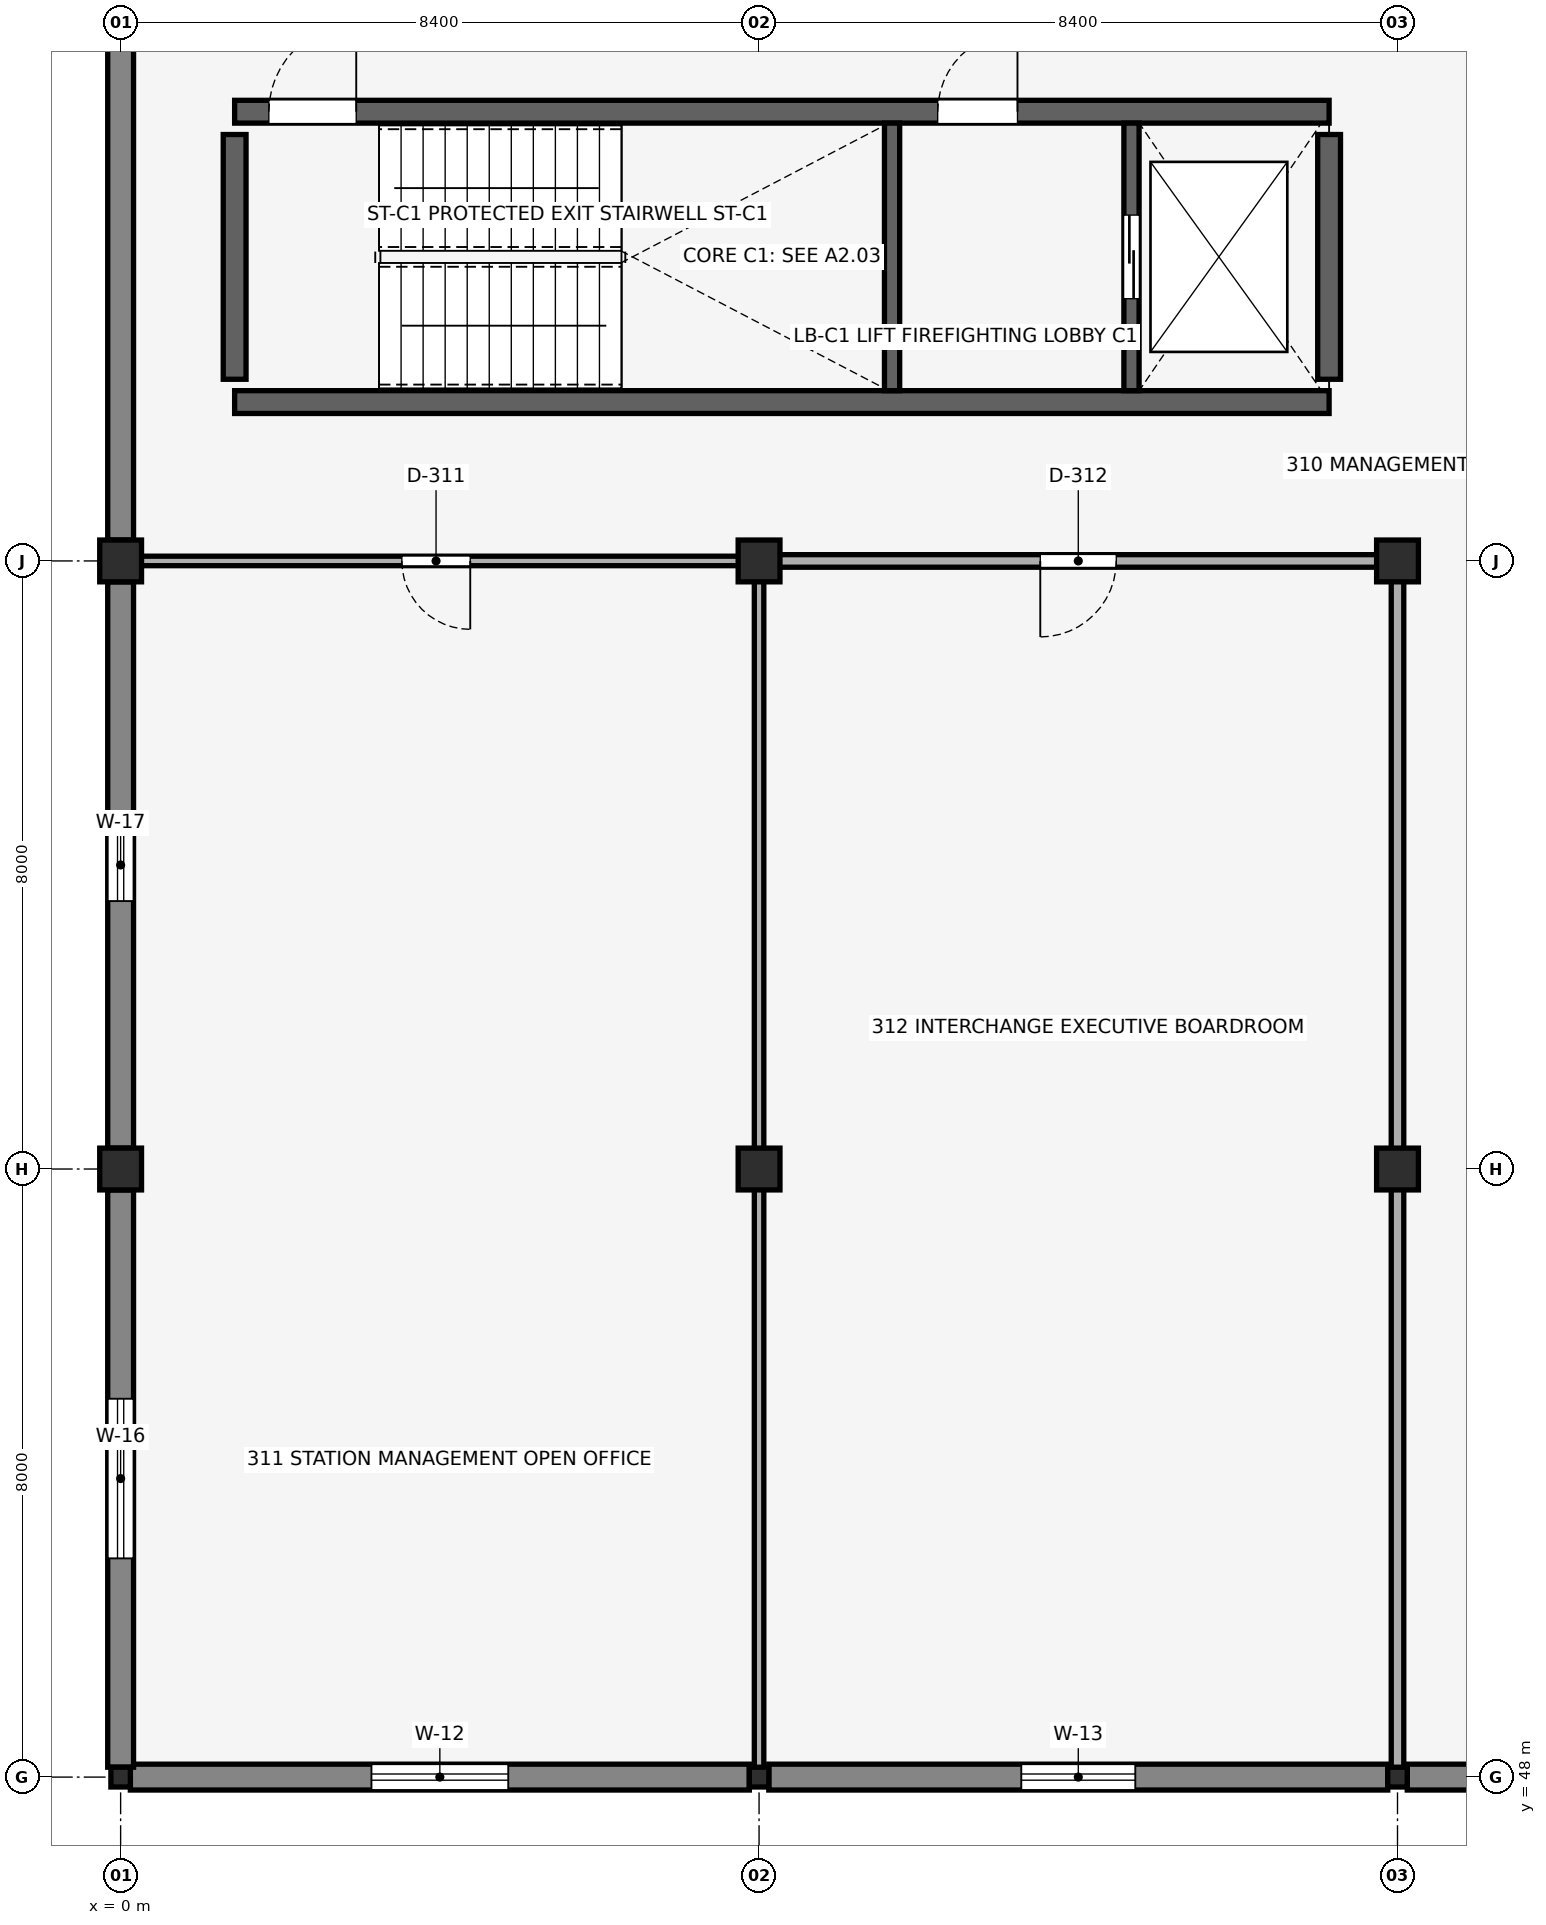
"""IFC4 building model, lengths in metres.
Left out: names, types, materials, properties, quantities, classifications, styles, units other than length and angle.
Written with IfcOpenShell. Run it as: python <this file> out.ifc"""

import sys

from ifc_helpers import new_model, si_unit, direction, frame, frame_2d, origin, origin_2d, place, context, subcontext, project, spatial, rectangle, i_section, extrude, element, fill, save


model = new_model("IFC4")
c1 = context("Model", 3, precision=1e-05, world=origin(), true_north=direction((0.0, 1.0)))
c2 = subcontext(c1, "Body", "Model", "MODEL_VIEW")
j1 = project(units=[si_unit("LENGTHUNIT", "METRE"), si_unit("PLANEANGLEUNIT", "RADIAN")], contexts=[c1])
p1 = place(None, origin())
s1 = spatial("IfcSite", under=j1, at=p1, CompositionType="ELEMENT")
p2 = place(p1, origin())
s2 = spatial("IfcBuilding", under=s1, at=p2, CompositionType="ELEMENT")
p3 = place(p2, frame((0.0, 0.0, 13.36)))
s3 = spatial("IfcBuildingStorey", under=s2, at=p3, CompositionType="ELEMENT", Elevation=13.36)
p4 = place(p3, frame((1.5, 66.09, 0.0), z_axis=(0.0, 0.0, 1.0), x_axis=(1.0, 0.0, 0.0)))
e1 = element("IfcWall", 1, at=p4, inside=s3, PredefinedType="SHEAR", context=c2, shape_type="SweptSolid", body=[
    extrude(rectangle(XDim=14.4, YDim=0.3, at=frame_2d((7.2, 0.0))), origin(), (0.0, 0.0, 1.0), 3.58),
])
p5 = place(p3, frame((1.5, 69.91, 0.0), z_axis=(0.0, 0.0, 1.0), x_axis=(1.0, 0.0, 0.0)))
e2 = element("IfcWall", 2, at=p5, inside=s3, PredefinedType="SHEAR", context=c2, shape_type="SweptSolid", body=[
    extrude(rectangle(XDim=14.4, YDim=0.3, at=frame_2d((7.2, 0.0))), origin(), (0.0, 0.0, 1.0), 3.58),
])
p6 = place(p5, frame((0.45, 0.0, 0.0), z_axis=(0.0, 0.0, 1.0), x_axis=(1.0, 0.0, 0.0)))
e3 = element("IfcOpeningElement", 3, at=p6, cuts=e2, PredefinedType="OPENING", context=c2, shape_type="SweptSolid", body=[
    extrude(rectangle(XDim=1.15, YDim=2.15, at=frame_2d((0.575, 1.075))), frame((0.0, 0.16, 0.0), z_axis=(0.0, -1.0, 0.0), x_axis=(1.0, 0.0, 0.0)), (0.0, 0.0, 1.0), 0.32),
])
p7 = place(p5, frame((9.25, 0.0, 0.0), z_axis=(0.0, 0.0, 1.0), x_axis=(1.0, 0.0, 0.0)))
e4 = element("IfcOpeningElement", 4, at=p7, cuts=e2, PredefinedType="OPENING", context=c2, shape_type="SweptSolid", body=[
    extrude(rectangle(XDim=1.05, YDim=2.15, at=frame_2d((0.525, 1.075))), frame((0.0, 0.16, 0.0), z_axis=(0.0, -1.0, 0.0), x_axis=(1.0, 0.0, 0.0)), (0.0, 0.0, 1.0), 0.32),
])
for number, where, z_axis, x_axis in (
    (5, (1.5, 66.39, 0.0), (0.0, 0.0, 1.0), (0.0, 1.0, 0.0)),
    (6, (15.9, 66.39, 0.0), (0.0, 0.0, 1.0), (0.0, 1.0, 0.0)),
):
    element("IfcWall", number, at=place(p3, frame(where, z_axis=z_axis, x_axis=x_axis)), inside=s3, PredefinedType="SHEAR", context=c2, shape_type="SweptSolid", body=[
        extrude(rectangle(XDim=3.22, YDim=0.3, at=frame_2d((1.61, 0.0))), origin(), (0.0, 0.0, 1.0), 3.58),
    ])
p8 = place(p3, frame((0.0, 48.0, 0.0), z_axis=(0.0, 0.0, 1.0), x_axis=(1.0, 0.0, 0.0)))
e7 = element("IfcColumn", 7, at=p8, inside=s3, PredefinedType="COLUMN", context=c2, shape_type="SweptSolid", body=[
    extrude(i_section(OverallWidth=0.256, OverallDepth=0.26, WebThickness=0.01, FlangeThickness=0.017, FilletRadius=0.013, at=origin_2d()), origin(), (0.0, 0.0, 1.0), 3.58),
])
for number, where, z_axis, x_axis in (
    (8, (0.0, 56.0, 0.0), (0.0, 0.0, 1.0), (1.0, 0.0, 0.0)),
    (9, (0.0, 64.0, 0.0), (0.0, 0.0, 1.0), (1.0, 0.0, 0.0)),
):
    element("IfcColumn", number, at=place(p3, frame(where, z_axis=z_axis, x_axis=x_axis)), inside=s3, PredefinedType="COLUMN", context=c2, shape_type="SweptSolid", body=[
        extrude(rectangle(XDim=0.55, YDim=0.55, at=origin_2d()), origin(), (0.0, 0.0, 1.0), 3.58),
    ])
p9 = place(p3, frame((8.4, 48.0, 0.0), z_axis=(0.0, 0.0, 1.0), x_axis=(1.0, 0.0, 0.0)))
e10 = element("IfcColumn", 10, at=p9, inside=s3, PredefinedType="COLUMN", context=c2, shape_type="SweptSolid", body=[
    extrude(i_section(OverallWidth=0.256, OverallDepth=0.26, WebThickness=0.01, FlangeThickness=0.017, FilletRadius=0.013, at=origin_2d()), origin(), (0.0, 0.0, 1.0), 3.58),
])
for number, where, z_axis, x_axis in (
    (11, (8.4, 56.0, 0.0), (0.0, 0.0, 1.0), (1.0, 0.0, 0.0)),
    (12, (8.4, 64.0, 0.0), (0.0, 0.0, 1.0), (1.0, 0.0, 0.0)),
):
    element("IfcColumn", number, at=place(p3, frame(where, z_axis=z_axis, x_axis=x_axis)), inside=s3, PredefinedType="COLUMN", context=c2, shape_type="SweptSolid", body=[
        extrude(rectangle(XDim=0.55, YDim=0.55, at=origin_2d()), origin(), (0.0, 0.0, 1.0), 3.58),
    ])
p10 = place(p3, frame((16.8, 48.0, 0.0), z_axis=(0.0, 0.0, 1.0), x_axis=(1.0, 0.0, 0.0)))
e13 = element("IfcColumn", 13, at=p10, inside=s3, PredefinedType="COLUMN", context=c2, shape_type="SweptSolid", body=[
    extrude(i_section(OverallWidth=0.256, OverallDepth=0.26, WebThickness=0.01, FlangeThickness=0.017, FilletRadius=0.013, at=origin_2d()), origin(), (0.0, 0.0, 1.0), 3.58),
])
for number, where, z_axis, x_axis in (
    (14, (16.8, 56.0, 0.0), (0.0, 0.0, 1.0), (1.0, 0.0, 0.0)),
    (15, (16.8, 64.0, 0.0), (0.0, 0.0, 1.0), (1.0, 0.0, 0.0)),
):
    element("IfcColumn", number, at=place(p3, frame(where, z_axis=z_axis, x_axis=x_axis)), inside=s3, PredefinedType="COLUMN", context=c2, shape_type="SweptSolid", body=[
        extrude(rectangle(XDim=0.55, YDim=0.55, at=origin_2d()), origin(), (0.0, 0.0, 1.0), 3.58),
    ])
p11 = place(p3, frame((0.128, 48.0, 0.0), z_axis=(0.0, 0.0, 1.0), x_axis=(1.0, 0.0, 0.0)))
e16 = element("IfcWall", 16, at=p11, inside=s3, PredefinedType="SOLIDWALL", context=c2, shape_type="SweptSolid", body=[
    extrude(rectangle(XDim=8.144, YDim=0.34, at=frame_2d((4.072, 0.0))), origin(), (0.0, 0.0, 1.0), 3.28),
])
p12 = place(p11, frame((3.172, 0.0, 0.9), z_axis=(0.0, 0.0, 1.0), x_axis=(1.0, 0.0, 0.0)))
e17 = element("IfcOpeningElement", 17, at=p12, cuts=e16, PredefinedType="OPENING", context=c2, shape_type="SweptSolid", body=[
    extrude(rectangle(XDim=1.8, YDim=1.3, at=frame_2d((0.9, 0.65))), frame((0.0, 0.18, 0.0), z_axis=(0.0, -1.0, 0.0), x_axis=(1.0, 0.0, 0.0)), (0.0, 0.0, 1.0), 0.36),
])
p13 = place(p3, frame((8.528, 48.0, 0.0), z_axis=(0.0, 0.0, 1.0), x_axis=(1.0, 0.0, 0.0)))
e18 = element("IfcWall", 18, at=p13, inside=s3, PredefinedType="SOLIDWALL", context=c2, shape_type="SweptSolid", body=[
    extrude(rectangle(XDim=8.144, YDim=0.34, at=frame_2d((4.072, 0.0))), origin(), (0.0, 0.0, 1.0), 3.28),
])
p14 = place(p13, frame((3.322, 0.0, 0.9), z_axis=(0.0, 0.0, 1.0), x_axis=(1.0, 0.0, 0.0)))
e19 = element("IfcOpeningElement", 19, at=p14, cuts=e18, PredefinedType="OPENING", context=c2, shape_type="SweptSolid", body=[
    extrude(rectangle(XDim=1.5, YDim=1.4, at=frame_2d((0.75, 0.7))), frame((0.0, 0.18, 0.0), z_axis=(0.0, -1.0, 0.0), x_axis=(1.0, 0.0, 0.0)), (0.0, 0.0, 1.0), 0.36),
])
p15 = place(p3, frame((16.928, 48.0, 0.0), z_axis=(0.0, 0.0, 1.0), x_axis=(1.0, 0.0, 0.0)))
e20 = element("IfcWall", 20, at=p15, inside=s3, PredefinedType="SOLIDWALL", context=c2, shape_type="SweptSolid", body=[
    extrude(rectangle(XDim=8.144, YDim=0.34, at=frame_2d((4.072, 0.0))), origin(), (0.0, 0.0, 1.0), 3.28),
])
p16 = place(p15, frame((2.472, 0.0, 1.55), z_axis=(0.0, 0.0, 1.0), x_axis=(1.0, 0.0, 0.0)))
e21 = element("IfcOpeningElement", 21, at=p16, cuts=e20, PredefinedType="OPENING", context=c2, shape_type="SweptSolid", body=[
    extrude(rectangle(XDim=3.2, YDim=0.9, at=frame_2d((1.6, 0.45))), frame((0.0, 0.18, 0.0), z_axis=(0.0, -1.0, 0.0), x_axis=(1.0, 0.0, 0.0)), (0.0, 0.0, 1.0), 0.36),
])
p17 = place(p3, frame((0.0, 48.13, 0.0), z_axis=(0.0, 0.0, 1.0), x_axis=(0.0, 1.0, 0.0)))
e22 = element("IfcWall", 22, at=p17, inside=s3, PredefinedType="SOLIDWALL", context=c2, shape_type="SweptSolid", body=[
    extrude(rectangle(XDim=7.595, YDim=0.34, at=frame_2d((3.797, 0.0))), origin(), (0.0, 0.0, 1.0), 3.28),
])
p18 = place(p17, frame((2.748, 0.0, 1.55), z_axis=(0.0, 0.0, 1.0), x_axis=(1.0, 0.0, 0.0)))
e23 = element("IfcOpeningElement", 23, at=p18, cuts=e22, PredefinedType="OPENING", context=c2, shape_type="SweptSolid", body=[
    extrude(rectangle(XDim=2.1, YDim=0.8, at=frame_2d((1.05, 0.4))), frame((0.0, 0.18, 0.0), z_axis=(0.0, -1.0, 0.0), x_axis=(1.0, 0.0, 0.0)), (0.0, 0.0, 1.0), 0.36),
])
p19 = place(p3, frame((0.0, 56.275, 0.0), z_axis=(0.0, 0.0, 1.0), x_axis=(0.0, 1.0, 0.0)))
e24 = element("IfcWall", 24, at=p19, inside=s3, PredefinedType="SOLIDWALL", context=c2, shape_type="SweptSolid", body=[
    extrude(rectangle(XDim=7.45, YDim=0.34, at=frame_2d((3.725, 0.0))), origin(), (0.0, 0.0, 1.0), 3.28),
])
p20 = place(p19, frame((3.25, 0.0, 0.65), z_axis=(0.0, 0.0, 1.0), x_axis=(1.0, 0.0, 0.0)))
e25 = element("IfcOpeningElement", 25, at=p20, cuts=e24, PredefinedType="OPENING", context=c2, shape_type="SweptSolid", body=[
    extrude(rectangle(XDim=0.95, YDim=2.1, at=frame_2d((0.475, 1.05))), frame((0.0, 0.18, 0.0), z_axis=(0.0, -1.0, 0.0), x_axis=(1.0, 0.0, 0.0)), (0.0, 0.0, 1.0), 0.36),
])
p21 = place(p3, frame((0.0, 64.275, 0.0), z_axis=(0.0, 0.0, 1.0), x_axis=(0.0, 1.0, 0.0)))
e26 = element("IfcWall", 26, at=p21, inside=s3, PredefinedType="SOLIDWALL", context=c2, shape_type="SweptSolid", body=[
    extrude(rectangle(XDim=7.45, YDim=0.34, at=frame_2d((3.725, 0.0))), origin(), (0.0, 0.0, 1.0), 3.28),
])
p22 = place(p3, frame((10.15, 66.24, 0.0), z_axis=(0.0, 0.0, 1.0), x_axis=(0.0, 1.0, 0.0)))
e27 = element("IfcWall", 27, at=p22, inside=s3, PredefinedType="SHEAR", context=c2, shape_type="SweptSolid", body=[
    extrude(rectangle(XDim=3.52, YDim=0.2, at=frame_2d((1.76, 0.0))), origin(), (0.0, 0.0, 1.0), 3.58),
])
p23 = place(p3, frame((13.3, 66.24, 0.0), z_axis=(0.0, 0.0, 1.0), x_axis=(0.0, 1.0, 0.0)))
e28 = element("IfcWall", 28, at=p23, inside=s3, PredefinedType="SHEAR", context=c2, shape_type="SweptSolid", body=[
    extrude(rectangle(XDim=3.52, YDim=0.2, at=frame_2d((1.76, 0.0))), origin(), (0.0, 0.0, 1.0), 3.58),
])
p24 = place(p23, frame((1.21, 0.0, 0.0), z_axis=(0.0, 0.0, 1.0), x_axis=(1.0, 0.0, 0.0)))
e29 = element("IfcOpeningElement", 29, at=p24, cuts=e28, PredefinedType="OPENING", context=c2, shape_type="SweptSolid", body=[
    extrude(rectangle(XDim=1.1, YDim=2.15, at=frame_2d((0.55, 1.075))), frame((0.0, 0.11, 0.0), z_axis=(0.0, -1.0, 0.0), x_axis=(1.0, 0.0, 0.0)), (0.0, 0.0, 1.0), 0.22),
])
p25 = place(p3, frame((0.265, 64.0, 0.0), z_axis=(0.0, 0.0, 1.0), x_axis=(1.0, 0.0, 0.0)))
e30 = element("IfcWall", 30, at=p25, inside=s3, PredefinedType="PARTITIONING", context=c2, shape_type="SweptSolid", body=[
    extrude(rectangle(XDim=7.87, YDim=0.125, at=frame_2d((3.935, 0.0))), origin(), (0.0, 0.0, 1.0), 3.123),
])
p26 = place(p25, frame((4.335, 0.0, 0.0), z_axis=(0.0, 0.0, 1.0), x_axis=(-1.0, 0.0, 0.0)))
e31 = element("IfcOpeningElement", 31, at=p26, cuts=e30, PredefinedType="OPENING", context=c2, shape_type="SweptSolid", body=[
    extrude(rectangle(XDim=0.9, YDim=2.1, at=frame_2d((0.45, 1.05))), frame((0.0, 0.073, 0.0), z_axis=(0.0, -1.0, 0.0), x_axis=(1.0, 0.0, 0.0)), (0.0, 0.0, 1.0), 0.145),
])
p27 = place(p3, frame((8.665, 64.0, 0.0), z_axis=(0.0, 0.0, 1.0), x_axis=(1.0, 0.0, 0.0)))
e32 = element("IfcWall", 32, at=p27, inside=s3, PredefinedType="PARTITIONING", context=c2, shape_type="SweptSolid", body=[
    extrude(rectangle(XDim=7.87, YDim=0.165, at=frame_2d((3.935, 0.0))), origin(), (0.0, 0.0, 1.0), 3.123),
])
p28 = place(p27, frame((4.435, 0.0, 0.0), z_axis=(0.0, 0.0, 1.0), x_axis=(-1.0, 0.0, 0.0)))
e33 = element("IfcOpeningElement", 33, at=p28, cuts=e32, PredefinedType="OPENING", context=c2, shape_type="SweptSolid", body=[
    extrude(rectangle(XDim=1.0, YDim=2.15, at=frame_2d((0.5, 1.075))), frame((0.0, 0.093, 0.0), z_axis=(0.0, -1.0, 0.0), x_axis=(1.0, 0.0, 0.0)), (0.0, 0.0, 1.0), 0.185),
])
p29 = place(p3, frame((8.4, 48.12, 0.0), z_axis=(0.0, 0.0, 1.0), x_axis=(0.0, 1.0, 0.0)))
e34 = element("IfcWall", 34, at=p29, inside=s3, PredefinedType="PARTITIONING", context=c2, shape_type="SweptSolid", body=[
    extrude(rectangle(XDim=7.615, YDim=0.125, at=frame_2d((3.808, 0.0))), origin(), (0.0, 0.0, 1.0), 3.126),
])
p30 = place(p3, frame((8.4, 56.265, 0.0), z_axis=(0.0, 0.0, 1.0), x_axis=(0.0, 1.0, 0.0)))
e35 = element("IfcWall", 35, at=p30, inside=s3, PredefinedType="PARTITIONING", context=c2, shape_type="SweptSolid", body=[
    extrude(rectangle(XDim=7.47, YDim=0.125, at=frame_2d((3.735, 0.0))), origin(), (0.0, 0.0, 1.0), 3.126),
])
p31 = place(p3, frame((16.8, 48.12, 0.0), z_axis=(0.0, 0.0, 1.0), x_axis=(0.0, 1.0, 0.0)))
e36 = element("IfcWall", 36, at=p31, inside=s3, PredefinedType="PARTITIONING", context=c2, shape_type="SweptSolid", body=[
    extrude(rectangle(XDim=7.615, YDim=0.165, at=frame_2d((3.808, 0.0))), origin(), (0.0, 0.0, 1.0), 3.126),
])
p32 = place(p3, frame((16.8, 56.265, 0.0), z_axis=(0.0, 0.0, 1.0), x_axis=(0.0, 1.0, 0.0)))
e37 = element("IfcWall", 37, at=p32, inside=s3, PredefinedType="PARTITIONING", context=c2, shape_type="SweptSolid", body=[
    extrude(rectangle(XDim=7.47, YDim=0.165, at=frame_2d((3.735, 0.0))), origin(), (0.0, 0.0, 1.0), 3.126),
])
p33 = place(p12, origin())
e38 = element("IfcWindow", 38, at=p33, inside=s3, PartitioningType="DOUBLE_PANEL_VERTICAL", PredefinedType="WINDOW", context=c2, shape_type="SweptSolid", body=[
    extrude(rectangle(XDim=1.8, YDim=1.3, at=frame_2d((0.9, 0.65))), frame((0.0, 0.03, 0.0), z_axis=(0.0, -1.0, 0.0), x_axis=(1.0, 0.0, 0.0)), (0.0, 0.0, 1.0), 0.06),
])
fill(e17, e38)
p34 = place(p14, origin())
e39 = element("IfcWindow", 39, at=p34, inside=s3, PartitioningType="SINGLE_PANEL", PredefinedType="WINDOW", context=c2, shape_type="SweptSolid", body=[
    extrude(rectangle(XDim=1.5, YDim=1.4, at=frame_2d((0.75, 0.7))), frame((0.0, 0.03, 0.0), z_axis=(0.0, -1.0, 0.0), x_axis=(1.0, 0.0, 0.0)), (0.0, 0.0, 1.0), 0.06),
])
fill(e19, e39)
p35 = place(p18, origin())
e40 = element("IfcWindow", 40, at=p35, inside=s3, PartitioningType="DOUBLE_PANEL_HORIZONTAL", PredefinedType="WINDOW", context=c2, shape_type="SweptSolid", body=[
    extrude(rectangle(XDim=2.1, YDim=0.8, at=frame_2d((1.05, 0.4))), frame((0.0, 0.03, 0.0), z_axis=(0.0, -1.0, 0.0), x_axis=(1.0, 0.0, 0.0)), (0.0, 0.0, 1.0), 0.06),
])
fill(e23, e40)
p36 = place(p20, origin())
e41 = element("IfcWindow", 41, at=p36, inside=s3, PartitioningType="SINGLE_PANEL", PredefinedType="WINDOW", context=c2, shape_type="SweptSolid", body=[
    extrude(rectangle(XDim=0.95, YDim=2.1, at=frame_2d((0.475, 1.05))), frame((0.0, 0.03, 0.0), z_axis=(0.0, -1.0, 0.0), x_axis=(1.0, 0.0, 0.0)), (0.0, 0.0, 1.0), 0.06),
])
fill(e25, e41)
p37 = place(p6, origin())
e42 = element("IfcDoor", 42, at=p37, inside=s3, OperationType="SINGLE_SWING_RIGHT", PredefinedType="DOOR", context=c2, shape_type="SweptSolid", body=[
    extrude(rectangle(XDim=1.15, YDim=2.15, at=frame_2d((0.575, 1.075))), frame((0.0, 0.025, 0.0), z_axis=(0.0, -1.0, 0.0), x_axis=(1.0, 0.0, 0.0)), (0.0, 0.0, 1.0), 0.05),
])
fill(e3, e42)
p38 = place(p7, origin())
e43 = element("IfcDoor", 43, at=p38, inside=s3, OperationType="SINGLE_SWING_RIGHT", PredefinedType="DOOR", context=c2, shape_type="SweptSolid", body=[
    extrude(rectangle(XDim=1.05, YDim=2.15, at=frame_2d((0.525, 1.075))), frame((0.0, 0.025, 0.0), z_axis=(0.0, -1.0, 0.0), x_axis=(1.0, 0.0, 0.0)), (0.0, 0.0, 1.0), 0.05),
])
fill(e4, e43)
p39 = place(p24, origin())
e44 = element("IfcDoor", 44, at=p39, inside=s3, OperationType="DOUBLE_DOOR_SLIDING", PredefinedType="DOOR", context=c2, shape_type="SweptSolid", body=[
    extrude(rectangle(XDim=1.1, YDim=2.15, at=frame_2d((0.55, 1.075))), frame((0.0, 0.025, 0.0), z_axis=(0.0, -1.0, 0.0), x_axis=(1.0, 0.0, 0.0)), (0.0, 0.0, 1.0), 0.05),
])
fill(e29, e44)
p40 = place(p26, origin())
e45 = element("IfcDoor", 45, at=p40, inside=s3, OperationType="SINGLE_SWING_LEFT", PredefinedType="DOOR", context=c2, shape_type="SweptSolid", body=[
    extrude(rectangle(XDim=0.9, YDim=2.1, at=frame_2d((0.45, 1.05))), frame((0.0, 0.025, 0.0), z_axis=(0.0, -1.0, 0.0), x_axis=(1.0, 0.0, 0.0)), (0.0, 0.0, 1.0), 0.05),
])
fill(e31, e45)
p41 = place(p28, origin())
e46 = element("IfcDoor", 46, at=p41, inside=s3, OperationType="SINGLE_SWING_RIGHT", PredefinedType="DOOR", context=c2, shape_type="SweptSolid", body=[
    extrude(rectangle(XDim=1.0, YDim=2.15, at=frame_2d((0.5, 1.075))), frame((0.0, 0.025, 0.0), z_axis=(0.0, -1.0, 0.0), x_axis=(1.0, 0.0, 0.0)), (0.0, 0.0, 1.0), 0.05),
])
fill(e33, e46)
save(model, sys.argv[1])
